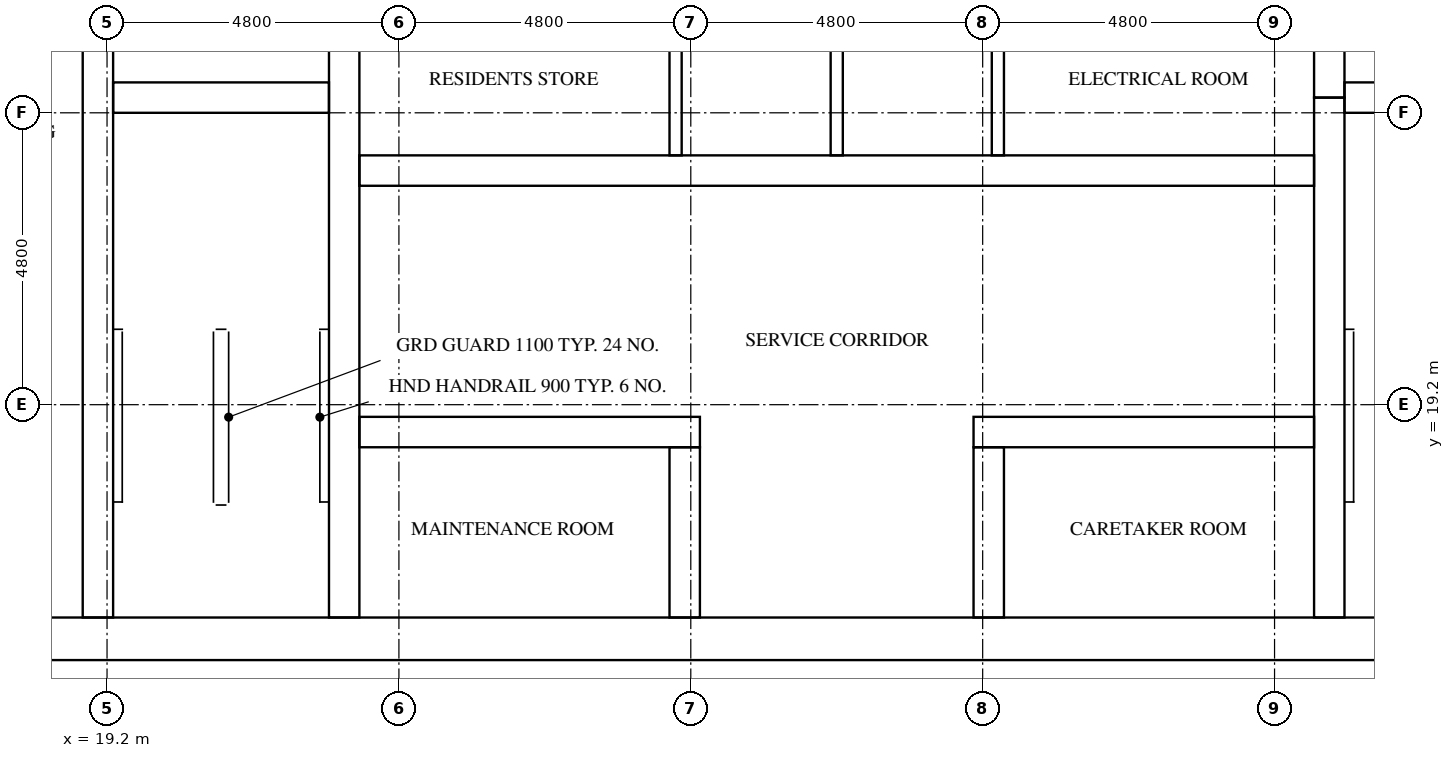
"""IFC4 building model, lengths in metres.
Left out: names, types, materials, properties, quantities, classifications, styles, units other than length and angle.
Written with IfcOpenShell. Run it as: python <this file> out.ifc"""

import sys

from ifc_helpers import new_model, si_unit, direction, frame, frame_2d, origin, place, context, subcontext, project, spatial, rectangle, extrude, element, fill, save


model = new_model("IFC4")
c1 = context("Model", 3, precision=1e-05, world=origin(), true_north=direction((0.0, 1.0)))
c2 = subcontext(c1, "Body", "Model", "MODEL_VIEW")
j1 = project(units=[si_unit("LENGTHUNIT", "METRE"), si_unit("PLANEANGLEUNIT", "RADIAN")], contexts=[c1])
p1 = place(None, origin())
s1 = spatial("IfcSite", under=j1, at=p1, CompositionType="ELEMENT")
p2 = place(p1, origin())
s2 = spatial("IfcBuilding", under=s1, at=p2, CompositionType="ELEMENT")
p3 = place(p2, frame((0.0, 0.0, 229.8)))
s3 = spatial("IfcBuildingStorey", under=s2, at=p3, CompositionType="ELEMENT", Elevation=229.8)
p4 = place(p3, frame((15.0, 15.35, 0.0), z_axis=(0.0, 0.0, 1.0), x_axis=(1.0, 0.0, 0.0)))
e1 = element("IfcWall", 1, at=p4, inside=s3, PredefinedType="SHEAR", context=c2, shape_type="SweptSolid", body=[
    extrude(rectangle(XDim=32.4, YDim=0.7, at=frame_2d((16.2, 0.0))), origin(), (0.0, 0.0, 1.0), 3.1),
])
p5 = place(p4, frame((15.3, 0.0, 0.0)))
e2 = element("IfcOpeningElement", 2, at=p5, cuts=e1, PredefinedType="OPENING", context=c2, shape_type="SweptSolid", body=[
    extrude(rectangle(XDim=1.8, YDim=2.1, at=frame_2d((0.9, 1.05))), frame((0.0, 0.36, 0.0), z_axis=(0.0, -1.0, 0.0), x_axis=(1.0, 0.0, 0.0)), (0.0, 0.0, 1.0), 0.72),
])
p6 = place(p3, frame((19.05, 15.7, 0.0), z_axis=(0.0, 0.0, 1.0), x_axis=(0.0, 1.0, 0.0)))
e3 = element("IfcWall", 3, at=p6, inside=s3, PredefinedType="SHEAR", context=c2, shape_type="SweptSolid", body=[
    extrude(rectangle(XDim=15.3, YDim=0.5, at=frame_2d((7.65, 0.0))), origin(), (0.0, 0.0, 1.0), 3.1),
])
p7 = place(p6, frame((9.75, 0.0, 0.0)))
e4 = element("IfcOpeningElement", 4, at=p7, cuts=e3, PredefinedType="OPENING", context=c2, shape_type="SweptSolid", body=[
    extrude(rectangle(XDim=1.1, YDim=2.1, at=frame_2d((0.55, 1.05))), frame((0.0, 0.26, 0.0), z_axis=(0.0, -1.0, 0.0), x_axis=(1.0, 0.0, 0.0)), (0.0, 0.0, 1.0), 0.52),
])
p8 = place(p6, frame((13.25, 0.0, 0.0)))
e5 = element("IfcOpeningElement", 5, at=p8, cuts=e3, PredefinedType="OPENING", context=c2, shape_type="SweptSolid", body=[
    extrude(rectangle(XDim=1.1, YDim=2.1, at=frame_2d((0.55, 1.05))), frame((0.0, 0.26, 0.0), z_axis=(0.0, -1.0, 0.0), x_axis=(1.0, 0.0, 0.0)), (0.0, 0.0, 1.0), 0.52),
])
p9 = place(p6, frame((0.5, 0.0, 0.0)))
e6 = element("IfcOpeningElement", 6, at=p9, cuts=e3, PredefinedType="OPENING", context=c2, shape_type="SweptSolid", body=[
    extrude(rectangle(XDim=1.2, YDim=2.1, at=frame_2d((0.6, 1.05))), frame((0.0, 0.26, 0.0), z_axis=(0.0, -1.0, 0.0), x_axis=(1.0, 0.0, 0.0)), (0.0, 0.0, 1.0), 0.52),
])
p10 = place(p3, frame((23.1, 15.7, 0.0), z_axis=(0.0, 0.0, 1.0), x_axis=(0.0, 1.0, 0.0)))
e7 = element("IfcWall", 7, at=p10, inside=s3, PredefinedType="SHEAR", context=c2, shape_type="SweptSolid", body=[
    extrude(rectangle(XDim=21.4, YDim=0.5, at=frame_2d((10.7, 0.0))), origin(), (0.0, 0.0, 1.0), 3.1),
])
p11 = place(p3, frame((39.3, 15.7, 0.0), z_axis=(0.0, 0.0, 1.0), x_axis=(0.0, 1.0, 0.0)))
e8 = element("IfcWall", 8, at=p11, inside=s3, PredefinedType="SHEAR", context=c2, shape_type="SweptSolid", body=[
    extrude(rectangle(XDim=8.55, YDim=0.5, at=frame_2d((4.275, 0.0))), origin(), (0.0, 0.0, 1.0), 3.1),
])
p12 = place(p3, frame((39.3, 24.25, 0.0), z_axis=(0.0, 0.0, 1.0), x_axis=(0.0, 1.0, 0.0)))
e9 = element("IfcWall", 9, at=p12, inside=s3, PredefinedType="SHEAR", context=c2, shape_type="SweptSolid", body=[
    extrude(rectangle(XDim=3.5, YDim=0.5, at=frame_2d((1.75, 0.0))), origin(), (0.0, 0.0, 1.0), 3.1),
])
for number, where, z_axis, x_axis in (
    (10, (19.3, 24.25, 0.0), (0.0, 0.0, 1.0), (1.0, 0.0, 0.0)),
    (11, (39.55, 24.25, 0.0), (0.0, 0.0, 1.0), (1.0, 0.0, 0.0)),
):
    element("IfcWall", number, at=place(p3, frame(where, z_axis=z_axis, x_axis=x_axis)), inside=s3, PredefinedType="SHEAR", context=c2, shape_type="SweptSolid", body=[
        extrude(rectangle(XDim=3.55, YDim=0.5, at=frame_2d((1.775, 0.0))), origin(), (0.0, 0.0, 1.0), 3.1),
    ])
p13 = place(p3, frame((23.35, 18.75, 0.0), z_axis=(0.0, 0.0, 1.0), x_axis=(1.0, 0.0, 0.0)))
e12 = element("IfcWall", 12, at=p13, inside=s3, PredefinedType="SHEAR", context=c2, shape_type="SweptSolid", body=[
    extrude(rectangle(XDim=5.6, YDim=0.5, at=frame_2d((2.8, 0.0))), origin(), (0.0, 0.0, 1.0), 3.1),
])
p14 = place(p13, frame((2.05, 0.0, 0.0)))
e13 = element("IfcOpeningElement", 13, at=p14, cuts=e12, PredefinedType="OPENING", context=c2, shape_type="SweptSolid", body=[
    extrude(rectangle(XDim=1.0, YDim=2.1, at=frame_2d((0.5, 1.05))), frame((0.0, 0.26, 0.0), z_axis=(0.0, -1.0, 0.0), x_axis=(1.0, 0.0, 0.0)), (0.0, 0.0, 1.0), 0.52),
])
p15 = place(p3, frame((33.45, 18.75, 0.0), z_axis=(0.0, 0.0, 1.0), x_axis=(1.0, 0.0, 0.0)))
e14 = element("IfcWall", 14, at=p15, inside=s3, PredefinedType="SHEAR", context=c2, shape_type="SweptSolid", body=[
    extrude(rectangle(XDim=5.6, YDim=0.5, at=frame_2d((2.8, 0.0))), origin(), (0.0, 0.0, 1.0), 3.1),
])
p16 = place(p15, frame((2.55, 0.0, 0.0)))
e15 = element("IfcOpeningElement", 15, at=p16, cuts=e14, PredefinedType="OPENING", context=c2, shape_type="SweptSolid", body=[
    extrude(rectangle(XDim=1.0, YDim=2.1, at=frame_2d((0.5, 1.05))), frame((0.0, 0.26, 0.0), z_axis=(0.0, -1.0, 0.0), x_axis=(1.0, 0.0, 0.0)), (0.0, 0.0, 1.0), 0.52),
])
p17 = place(p3, frame((23.35, 23.05, 0.0), z_axis=(0.0, 0.0, 1.0), x_axis=(1.0, 0.0, 0.0)))
e16 = element("IfcWall", 16, at=p17, inside=s3, PredefinedType="SHEAR", context=c2, shape_type="SweptSolid", body=[
    extrude(rectangle(XDim=15.7, YDim=0.5, at=frame_2d((7.85, 0.0))), origin(), (0.0, 0.0, 1.0), 3.1),
])
p18 = place(p17, frame((2.05, 0.0, 0.0)))
e17 = element("IfcOpeningElement", 17, at=p18, cuts=e16, PredefinedType="OPENING", context=c2, shape_type="SweptSolid", body=[
    extrude(rectangle(XDim=1.0, YDim=2.1, at=frame_2d((0.5, 1.05))), frame((0.0, 0.26, 0.0), z_axis=(0.0, -1.0, 0.0), x_axis=(1.0, 0.0, 0.0)), (0.0, 0.0, 1.0), 0.52),
])
p19 = place(p17, frame((12.65, 0.0, 0.0)))
e18 = element("IfcOpeningElement", 18, at=p19, cuts=e16, PredefinedType="OPENING", context=c2, shape_type="SweptSolid", body=[
    extrude(rectangle(XDim=1.0, YDim=2.1, at=frame_2d((0.5, 1.05))), frame((0.0, 0.26, 0.0), z_axis=(0.0, -1.0, 0.0), x_axis=(1.0, 0.0, 0.0)), (0.0, 0.0, 1.0), 0.52),
])
for number, where, z_axis, x_axis in (
    (19, (28.7, 15.7, 0.0), (0.0, 0.0, 1.0), (0.0, 1.0, 0.0)),
    (20, (33.7, 15.7, 0.0), (0.0, 0.0, 1.0), (0.0, 1.0, 0.0)),
):
    element("IfcWall", number, at=place(p3, frame(where, z_axis=z_axis, x_axis=x_axis)), inside=s3, PredefinedType="SHEAR", context=c2, shape_type="SweptSolid", body=[
        extrude(rectangle(XDim=2.8, YDim=0.5, at=frame_2d((1.4, 0.0))), origin(), (0.0, 0.0, 1.0), 3.1),
    ])
for number, where, z_axis, x_axis in (
    (21, (28.55, 23.3, 0.0), (0.0, 0.0, 1.0), (0.0, 1.0, 0.0)),
    (22, (31.2, 23.3, 0.0), (0.0, 0.0, 1.0), (0.0, 1.0, 0.0)),
    (23, (33.85, 23.3, 0.0), (0.0, 0.0, 1.0), (0.0, 1.0, 0.0)),
):
    element("IfcWall", number, at=place(p3, frame(where, z_axis=z_axis, x_axis=x_axis)), inside=s3, PredefinedType="SOLIDWALL", context=c2, shape_type="SweptSolid", body=[
        extrude(rectangle(XDim=2.6, YDim=0.2, at=frame_2d((1.3, 0.0))), origin(), (0.0, 0.0, 1.0), 3.1),
    ])
p20 = place(p9, frame((1.2, 0.0, 0.0), z_axis=(0.0, 0.0, 1.0), x_axis=(-1.0, 0.0, 0.0)))
e24 = element("IfcDoor", 24, at=p20, inside=s3, OperationType="SINGLE_SWING_RIGHT", PredefinedType="DOOR", context=c2, shape_type="SweptSolid", body=[
    extrude(rectangle(XDim=1.2, YDim=2.1, at=frame_2d((0.6, 1.05))), frame((0.0, 0.025, 0.0), z_axis=(0.0, -1.0, 0.0), x_axis=(1.0, 0.0, 0.0)), (0.0, 0.0, 1.0), 0.05),
])
fill(e6, e24)
p21 = place(p5, frame((1.8, 0.0, 0.0), z_axis=(0.0, 0.0, 1.0), x_axis=(-1.0, 0.0, 0.0)))
e25 = element("IfcDoor", 25, at=p21, inside=s3, OperationType="DOUBLE_DOOR_SINGLE_SWING", PredefinedType="DOOR", context=c2, shape_type="SweptSolid", body=[
    extrude(rectangle(XDim=1.8, YDim=2.1, at=frame_2d((0.9, 1.05))), frame((0.0, 0.025, 0.0), z_axis=(0.0, -1.0, 0.0), x_axis=(1.0, 0.0, 0.0)), (0.0, 0.0, 1.0), 0.05),
])
fill(e2, e25)
p22 = place(p18, frame((1.0, 0.0, 0.0), z_axis=(0.0, 0.0, 1.0), x_axis=(-1.0, 0.0, 0.0)))
e26 = element("IfcDoor", 26, at=p22, inside=s3, OperationType="SINGLE_SWING_LEFT", PredefinedType="DOOR", context=c2, shape_type="SweptSolid", body=[
    extrude(rectangle(XDim=1.0, YDim=2.1, at=frame_2d((0.5, 1.05))), frame((0.0, 0.025, 0.0), z_axis=(0.0, -1.0, 0.0), x_axis=(1.0, 0.0, 0.0)), (0.0, 0.0, 1.0), 0.05),
])
fill(e17, e26)
p23 = place(p19, frame((1.0, 0.0, 0.0), z_axis=(0.0, 0.0, 1.0), x_axis=(-1.0, 0.0, 0.0)))
e27 = element("IfcDoor", 27, at=p23, inside=s3, OperationType="SINGLE_SWING_RIGHT", PredefinedType="DOOR", context=c2, shape_type="SweptSolid", body=[
    extrude(rectangle(XDim=1.0, YDim=2.1, at=frame_2d((0.5, 1.05))), frame((0.0, 0.025, 0.0), z_axis=(0.0, -1.0, 0.0), x_axis=(1.0, 0.0, 0.0)), (0.0, 0.0, 1.0), 0.05),
])
fill(e18, e27)
p24 = place(p14, origin())
e28 = element("IfcDoor", 28, at=p24, inside=s3, OperationType="SINGLE_SWING_LEFT", PredefinedType="DOOR", context=c2, shape_type="SweptSolid", body=[
    extrude(rectangle(XDim=1.0, YDim=2.1, at=frame_2d((0.5, 1.05))), frame((0.0, 0.025, 0.0), z_axis=(0.0, -1.0, 0.0), x_axis=(1.0, 0.0, 0.0)), (0.0, 0.0, 1.0), 0.05),
])
fill(e13, e28)
p25 = place(p16, origin())
e29 = element("IfcDoor", 29, at=p25, inside=s3, OperationType="SINGLE_SWING_RIGHT", PredefinedType="DOOR", context=c2, shape_type="SweptSolid", body=[
    extrude(rectangle(XDim=1.0, YDim=2.1, at=frame_2d((0.5, 1.05))), frame((0.0, 0.025, 0.0), z_axis=(0.0, -1.0, 0.0), x_axis=(1.0, 0.0, 0.0)), (0.0, 0.0, 1.0), 0.05),
])
fill(e15, e29)
save(model, sys.argv[1])
